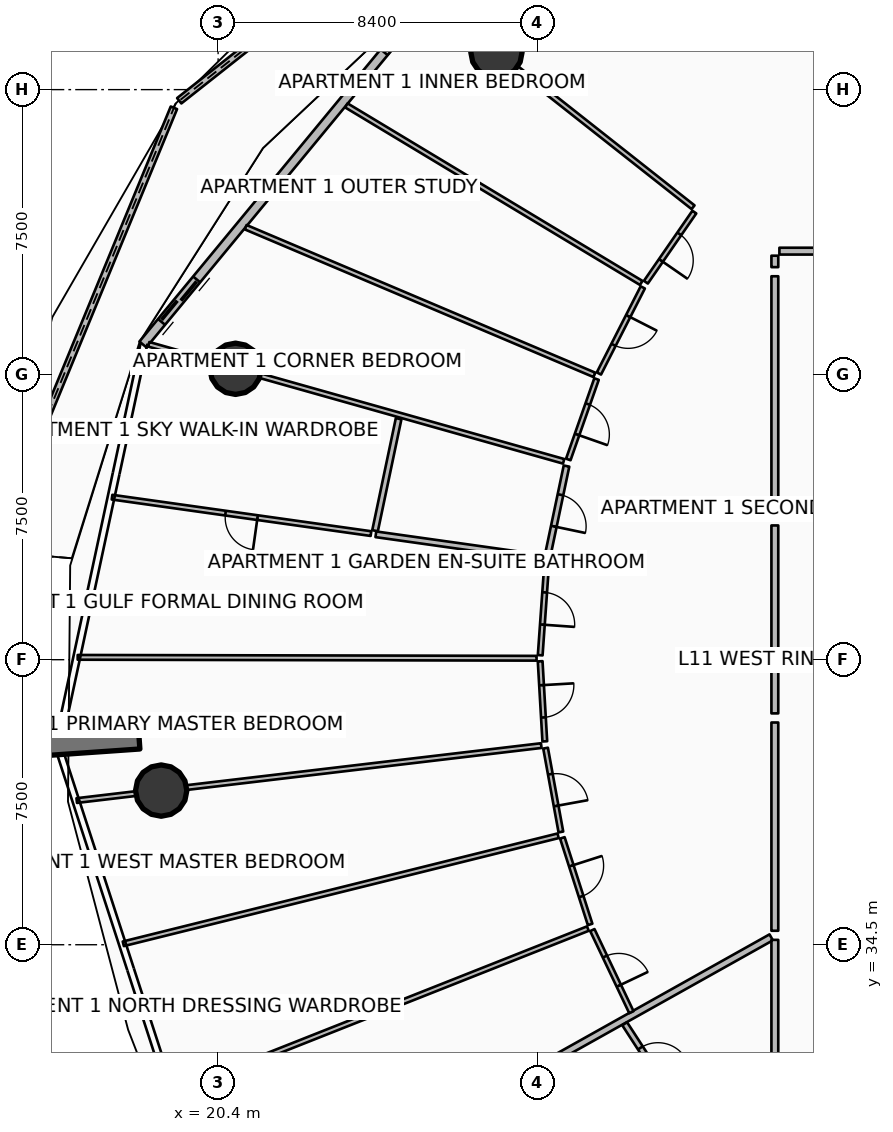
"""IFC4 building model, lengths in metres.
Left out: names, types, materials, properties, quantities, classifications, styles, units other than length and angle.
Written with IfcOpenShell. Run it as: python <this file> out.ifc"""

import sys

from ifc_helpers import new_model, si_unit, direction, frame, frame_2d, origin, origin_2d, place, context, subcontext, project, spatial, polyline, rectangle, circle, outline, extrude, element, fill, save


model = new_model("IFC4")
c1 = context("Model", 3, precision=1e-05, world=origin(), true_north=direction((0.0, 1.0)))
c2 = subcontext(c1, "Body", "Model", "MODEL_VIEW")
j1 = project(units=[si_unit("LENGTHUNIT", "METRE"), si_unit("PLANEANGLEUNIT", "RADIAN")], contexts=[c1])
p1 = place(None, origin())
s1 = spatial("IfcSite", under=j1, at=p1, CompositionType="ELEMENT")
p2 = place(p1, origin())
s2 = spatial("IfcBuilding", under=s1, at=p2, CompositionType="ELEMENT")
p3 = place(p2, frame((0.0, 0.0, 48.9)))
s3 = spatial("IfcBuildingStorey", under=s2, at=p3, CompositionType="ELEMENT", Elevation=48.9)
p4 = place(p3, frame((18.322, 39.925, 0.0), z_axis=(0.0, 0.0, 1.0), x_axis=(-0.997564163539, -0.069754853754, 0.0)))
e1 = element("IfcWall", 1, at=p4, inside=s3, PredefinedType="SOLIDWALL", context=c2, shape_type="SweptSolid", body=[
    extrude(rectangle(XDim=3.5, YDim=0.55, at=frame_2d((1.75, 0.0))), origin(), (0.0, 0.0, 1.0), 3.75),
])
for number, where, z_axis, x_axis in (
    (2, (27.724, 57.984, 0.0), (0.0, 0.0, 1.0), (1.0, 0.0, 0.0)),
    (3, (20.859, 49.655, 0.0), (0.0, 0.0, 1.0), (1.0, 0.0, 0.0)),
    (4, (18.902, 38.556, 0.0), (0.0, 0.0, 1.0), (1.0, 0.0, 0.0)),
):
    element("IfcColumn", number, at=place(p3, frame(where, z_axis=z_axis, x_axis=x_axis)), inside=s3, PredefinedType="COLUMN", context=c2, shape_type="SweptSolid", body=[
        extrude(circle(Radius=0.675, at=origin_2d()), origin(), (0.0, 0.0, 1.0), 3.5),
    ])
p5 = place(p3, frame((28.828, 64.171, 0.0), z_axis=(0.0, 0.0, 1.0), x_axis=(-0.784771193171, -0.619785587416, 0.0)))
e5 = element("IfcWall", 5, at=p5, inside=s3, PredefinedType="PARAPET", context=c2, shape_type="SweptSolid", body=[
    extrude(outline(polyline([(0.0, 0.0), (12.044, 0.0), (12.044, 1.832), (6.022, 1.853), (0.0, 1.756), (0.0, 0.0)])), frame((0.0, 0.09, 0.0), z_axis=(0.0, -1.0, 0.0), x_axis=(1.0, 0.0, 0.0)), (0.0, 0.0, 1.0), 0.18),
])
p6 = place(p3, frame((19.237, 56.521, 0.0), z_axis=(0.0, 0.0, 1.0), x_axis=(-0.381082407016, -0.924541074838, 0.0)))
e6 = element("IfcWall", 6, at=p6, inside=s3, PredefinedType="PARAPET", context=c2, shape_type="SweptSolid", body=[
    extrude(outline(polyline([(0.0, 0.0), (12.625, 0.0), (12.625, 1.497), (6.312, 1.696), (0.0, 1.832), (0.0, 0.0)])), frame((0.0, 0.09, 0.0), z_axis=(0.0, -1.0, 0.0), x_axis=(1.0, 0.0, 0.0)), (0.0, 0.0, 1.0), 0.18),
])
p7 = place(p3, frame((25.967, 59.433, 0.0), z_axis=(0.0, 0.0, 1.0), x_axis=(-0.636674332663, -0.771132799281, 0.0)))
e7 = element("IfcWall", 7, at=p7, inside=s3, PredefinedType="SOLIDWALL", context=c2, shape_type="SweptSolid", body=[
    extrude(rectangle(XDim=11.851, YDim=0.24, at=frame_2d((5.926, 0.0))), origin(), (0.0, 0.0, 1.0), 2.45),
])
p8 = place(p7, frame((9.631, 0.0, 0.0)))
e8 = element("IfcOpeningElement", 8, at=p8, cuts=e7, PredefinedType="OPENING", context=c2, shape_type="SweptSolid", body=[
    extrude(rectangle(XDim=1.45, YDim=2.15, at=frame_2d((0.725, 1.075))), frame((0.0, 0.13, 0.0), z_axis=(0.0, -1.0, 0.0), x_axis=(1.0, 0.0, 0.0)), (0.0, 0.0, 1.0), 0.26),
])
p9 = place(p7, frame((0.28, 0.0, 0.65)))
e9 = element("IfcOpeningElement", 9, at=p9, cuts=e7, PredefinedType="OPENING", context=c2, shape_type="SweptSolid", body=[
    extrude(rectangle(XDim=1.6, YDim=1.5, at=frame_2d((0.8, 0.75))), frame((0.0, 0.13, 0.0), z_axis=(0.0, -1.0, 0.0), x_axis=(1.0, 0.0, 0.0)), (0.0, 0.0, 1.0), 0.26),
])
p10 = place(p3, frame((34.954, 34.694, 0.0), z_axis=(0.0, 0.0, 1.0), x_axis=(-0.872493465611, -0.488625779577, 0.0)))
e10 = element("IfcWall", 10, at=p10, inside=s3, PredefinedType="PARTITIONING", context=c2, shape_type="SweptSolid", body=[
    extrude(rectangle(XDim=16.586, YDim=0.18, at=frame_2d((8.293, 0.0))), origin(), (0.0, 0.0, 1.0), 2.867),
])
p11 = place(p3, frame((41.86, 52.75, 0.0), z_axis=(0.0, 0.0, 1.0), x_axis=(-1.0, 0.0, 0.0)))
e11 = element("IfcWall", 11, at=p11, inside=s3, PredefinedType="PARTITIONING", context=c2, shape_type="SweptSolid", body=[
    extrude(rectangle(XDim=6.69, YDim=0.18, at=frame_2d((3.345, 0.0))), origin(), (0.0, 0.0, 1.0), 2.867),
])
p12 = place(p11, frame((2.795, 0.0, 0.0)))
e12 = element("IfcOpeningElement", 12, at=p12, cuts=e11, PredefinedType="OPENING", context=c2, shape_type="SweptSolid", body=[
    extrude(rectangle(XDim=1.1, YDim=2.1, at=frame_2d((0.55, 1.05))), frame((0.0, 0.1, 0.0), z_axis=(0.0, -1.0, 0.0), x_axis=(1.0, 0.0, 0.0)), (0.0, 0.0, 1.0), 0.2),
])
p13 = place(p3, frame((35.05, 52.63, 0.0), z_axis=(0.0, 0.0, 1.0), x_axis=(0.0, -1.0, 0.0)))
e13 = element("IfcWall", 13, at=p13, inside=s3, PredefinedType="PARTITIONING", context=c2, shape_type="SweptSolid", body=[
    extrude(rectangle(XDim=0.301, YDim=0.18, at=frame_2d((0.15, 0.0))), origin(), (0.0, 0.0, 1.0), 2.867),
])
p14 = place(p3, frame((35.05, 52.089, 0.0), z_axis=(0.0, 0.0, 1.0), x_axis=(0.0, -1.0, 0.0)))
e14 = element("IfcWall", 14, at=p14, inside=s3, PredefinedType="PARTITIONING", context=c2, shape_type="SweptSolid", body=[
    extrude(rectangle(XDim=6.317, YDim=0.18, at=frame_2d((3.158, 0.0))), origin(), (0.0, 0.0, 1.0), 2.867),
])
p15 = place(p3, frame((32.898, 53.905, 0.0), z_axis=(0.0, 0.0, 1.0), x_axis=(-0.78532854108, 0.619079221558, 0.0)))
e15 = element("IfcWall", 15, at=p15, inside=s3, PredefinedType="PARTITIONING", context=c2, shape_type="SweptSolid", body=[
    extrude(rectangle(XDim=8.842, YDim=0.125, at=frame_2d((4.421, 0.0))), origin(), (0.0, 0.0, 1.0), 2.867),
])
p16 = place(p3, frame((31.534, 51.913, 0.0), z_axis=(0.0, 0.0, 1.0), x_axis=(-0.856706990958, 0.515803384676, 0.0)))
e16 = element("IfcWall", 16, at=p16, inside=s3, PredefinedType="PARTITIONING", context=c2, shape_type="SweptSolid", body=[
    extrude(rectangle(XDim=9.057, YDim=0.125, at=frame_2d((4.528, 0.0))), origin(), (0.0, 0.0, 1.0), 2.94),
])
p17 = place(p3, frame((30.301, 49.494, 0.0), z_axis=(0.0, 0.0, 1.0), x_axis=(-0.920840746031, 0.389938867579, 0.0)))
e17 = element("IfcWall", 17, at=p17, inside=s3, PredefinedType="PARTITIONING", context=c2, shape_type="SweptSolid", body=[
    extrude(rectangle(XDim=9.966, YDim=0.125, at=frame_2d((4.983, 0.0))), origin(), (0.0, 0.0, 1.0), 2.94),
])
p18 = place(p3, frame((32.931, 53.778, 0.0), z_axis=(0.0, 0.0, 1.0), x_axis=(-0.568541738061, -0.822654418382, 0.0)))
e18 = element("IfcWall", 18, at=p18, inside=s3, PredefinedType="PARTITIONING", context=c2, shape_type="SweptSolid", body=[
    extrude(rectangle(XDim=2.242, YDim=0.125, at=frame_2d((1.121, 0.0))), origin(), (0.0, 0.0, 1.0), 2.867),
])
p19 = place(p18, frame((0.696, 0.0, 0.0)))
e19 = element("IfcOpeningElement", 19, at=p19, cuts=e18, PredefinedType="OPENING", context=c2, shape_type="SweptSolid", body=[
    extrude(rectangle(XDim=0.85, YDim=2.06, at=frame_2d((0.425, 1.03))), frame((0.0, 0.073, 0.0), z_axis=(0.0, -1.0, 0.0), x_axis=(1.0, 0.0, 0.0)), (0.0, 0.0, 1.0), 0.145),
])
p20 = place(p3, frame((31.575, 51.796, 0.0), z_axis=(0.0, 0.0, 1.0), x_axis=(-0.454037986735, -0.890982326762, 0.0)))
e20 = element("IfcWall", 20, at=p20, inside=s3, PredefinedType="PARTITIONING", context=c2, shape_type="SweptSolid", body=[
    extrude(rectangle(XDim=2.542, YDim=0.125, at=frame_2d((1.271, 0.0))), origin(), (0.0, 0.0, 1.0), 2.94),
])
p21 = place(p20, frame((0.846, 0.0, 0.0)))
e21 = element("IfcOpeningElement", 21, at=p21, cuts=e20, PredefinedType="OPENING", context=c2, shape_type="SweptSolid", body=[
    extrude(rectangle(XDim=0.85, YDim=2.06, at=frame_2d((0.425, 1.03))), frame((0.0, 0.073, 0.0), z_axis=(0.0, -1.0, 0.0), x_axis=(1.0, 0.0, 0.0)), (0.0, 0.0, 1.0), 0.145),
])
p22 = place(p3, frame((30.358, 49.384, 0.0), z_axis=(0.0, 0.0, 1.0), x_axis=(-0.331344536708, -0.943509829304, 0.0)))
e22 = element("IfcWall", 22, at=p22, inside=s3, PredefinedType="PARTITIONING", context=c2, shape_type="SweptSolid", body=[
    extrude(rectangle(XDim=2.242, YDim=0.125, at=frame_2d((1.121, 0.0))), origin(), (0.0, 0.0, 1.0), 2.867),
])
p23 = place(p22, frame((0.696, 0.0, 0.0)))
e23 = element("IfcOpeningElement", 23, at=p23, cuts=e22, PredefinedType="OPENING", context=c2, shape_type="SweptSolid", body=[
    extrude(rectangle(XDim=0.85, YDim=2.06, at=frame_2d((0.425, 1.03))), frame((0.0, 0.073, 0.0), z_axis=(0.0, -1.0, 0.0), x_axis=(1.0, 0.0, 0.0)), (0.0, 0.0, 1.0), 0.145),
])
p24 = place(p3, frame((35.05, 45.532, 0.0), z_axis=(0.0, 0.0, 1.0), x_axis=(0.0, -1.0, 0.0)))
e24 = element("IfcWall", 24, at=p24, inside=s3, PredefinedType="PARTITIONING", context=c2, shape_type="SweptSolid", body=[
    extrude(rectangle(XDim=4.945, YDim=0.18, at=frame_2d((2.472, 0.0))), origin(), (0.0, 0.0, 1.0), 2.867),
])
p25 = place(p3, frame((29.492, 47.22, 0.0), z_axis=(0.0, 0.0, 1.0), x_axis=(-0.962454721813, 0.271442274635, 0.0)))
e25 = element("IfcWall", 25, at=p25, inside=s3, PredefinedType="PARTITIONING", context=c2, shape_type="SweptSolid", body=[
    extrude(rectangle(XDim=11.344, YDim=0.125, at=frame_2d((5.672, 0.0))), origin(), (0.0, 0.0, 1.0), 2.867),
])
p26 = place(p3, frame((29.568, 47.095, 0.0), z_axis=(0.0, 0.0, 1.0), x_axis=(-0.205861309483, -0.978581177654, 0.0)))
e26 = element("IfcWall", 26, at=p26, inside=s3, PredefinedType="PARTITIONING", context=c2, shape_type="SweptSolid", body=[
    extrude(rectangle(XDim=2.392, YDim=0.15, at=frame_2d((1.196, 0.0))), origin(), (0.0, 0.0, 1.0), 2.867),
])
p27 = place(p26, frame((0.771, 0.0, 0.0)))
e27 = element("IfcOpeningElement", 27, at=p27, cuts=e26, PredefinedType="OPENING", context=c2, shape_type="SweptSolid", body=[
    extrude(rectangle(XDim=0.85, YDim=2.06, at=frame_2d((0.425, 1.03))), frame((0.0, 0.085, 0.0), z_axis=(0.0, -1.0, 0.0), x_axis=(1.0, 0.0, 0.0)), (0.0, 0.0, 1.0), 0.17),
])
p28 = place(p3, frame((25.15, 48.341, 0.0), z_axis=(0.0, 0.0, 1.0), x_axis=(-0.205879759174, -0.978577296264, 0.0)))
e28 = element("IfcWall", 28, at=p28, inside=s3, PredefinedType="PARTITIONING", context=c2, shape_type="SweptSolid", body=[
    extrude(rectangle(XDim=3.012, YDim=0.15, at=frame_2d((1.506, 0.0))), origin(), (0.0, 0.0, 1.0), 2.867),
])
p29 = place(p3, frame((28.968, 44.678, 0.0), z_axis=(0.0, 0.0, 1.0), x_axis=(-0.990240767804, 0.139367219172, 0.0)))
e29 = element("IfcWall", 29, at=p29, inside=s3, PredefinedType="PARTITIONING", context=c2, shape_type="SweptSolid", body=[
    extrude(rectangle(XDim=4.46, YDim=0.15, at=frame_2d((2.23, 0.0))), origin(), (0.0, 0.0, 1.0), 2.94),
])
p30 = place(p3, frame((24.422, 45.318, 0.0), z_axis=(0.0, 0.0, 1.0), x_axis=(-0.990243959665, 0.139344538274, 0.0)))
e30 = element("IfcWall", 30, at=p30, inside=s3, PredefinedType="PARTITIONING", context=c2, shape_type="SweptSolid", body=[
    extrude(rectangle(XDim=6.88, YDim=0.125, at=frame_2d((3.44, 0.0))), origin(), (0.0, 0.0, 1.0), 2.94),
])
p31 = place(p30, frame((3.015, 0.0, 0.0)))
e31 = element("IfcOpeningElement", 31, at=p31, cuts=e30, PredefinedType="OPENING", context=c2, shape_type="SweptSolid", body=[
    extrude(rectangle(XDim=0.85, YDim=2.06, at=frame_2d((0.425, 1.03))), frame((0.0, 0.073, 0.0), z_axis=(0.0, -1.0, 0.0), x_axis=(1.0, 0.0, 0.0)), (0.0, 0.0, 1.0), 0.145),
])
p32 = place(p3, frame((28.78, 42.038, 0.0), z_axis=(0.0, 0.0, 1.0), x_axis=(-0.999998036955, 0.001981435282, 0.0)))
e32 = element("IfcWall", 32, at=p32, inside=s3, PredefinedType="PARTITIONING", context=c2, shape_type="SweptSolid", body=[
    extrude(rectangle(XDim=12.075, YDim=0.125, at=frame_2d((6.038, 0.0))), origin(), (0.0, 0.0, 1.0), 2.94),
])
p33 = place(p3, frame((29.05, 44.576, 0.0), z_axis=(0.0, 0.0, 1.0), x_axis=(-0.070831673661, -0.997488282641, 0.0)))
e33 = element("IfcWall", 33, at=p33, inside=s3, PredefinedType="PARTITIONING", context=c2, shape_type="SweptSolid", body=[
    extrude(rectangle(XDim=2.464, YDim=0.125, at=frame_2d((1.232, 0.0))), origin(), (0.0, 0.0, 1.0), 2.94),
])
p34 = place(p33, frame((0.807, 0.0, 0.0)))
e34 = element("IfcOpeningElement", 34, at=p34, cuts=e33, PredefinedType="OPENING", context=c2, shape_type="SweptSolid", body=[
    extrude(rectangle(XDim=0.85, YDim=2.06, at=frame_2d((0.425, 1.03))), frame((0.0, 0.073, 0.0), z_axis=(0.0, -1.0, 0.0), x_axis=(1.0, 0.0, 0.0)), (0.0, 0.0, 1.0), 0.145),
])
p35 = place(p3, frame((28.875, 41.958, 0.0), z_axis=(0.0, 0.0, 1.0), x_axis=(0.057962417622, -0.998318765797, 0.0)))
e35 = element("IfcWall", 35, at=p35, inside=s3, PredefinedType="PARTITIONING", context=c2, shape_type="SweptSolid", body=[
    extrude(rectangle(XDim=2.11, YDim=0.125, at=frame_2d((1.055, 0.0))), origin(), (0.0, 0.0, 1.0), 2.867),
])
p36 = place(p35, frame((0.63, 0.0, 0.0)))
e36 = element("IfcOpeningElement", 36, at=p36, cuts=e35, PredefinedType="OPENING", context=c2, shape_type="SweptSolid", body=[
    extrude(rectangle(XDim=0.85, YDim=2.06, at=frame_2d((0.425, 1.03))), frame((0.0, 0.073, 0.0), z_axis=(0.0, -1.0, 0.0), x_axis=(1.0, 0.0, 0.0)), (0.0, 0.0, 1.0), 0.145),
])
p37 = place(p3, frame((35.05, 40.347, 0.0), z_axis=(0.0, 0.0, 1.0), x_axis=(0.0, -1.0, 0.0)))
e37 = element("IfcWall", 37, at=p37, inside=s3, PredefinedType="PARTITIONING", context=c2, shape_type="SweptSolid", body=[
    extrude(rectangle(XDim=5.48, YDim=0.18, at=frame_2d((2.74, 0.0))), origin(), (0.0, 0.0, 1.0), 2.867),
])
p38 = place(p3, frame((28.903, 39.74, 0.0), z_axis=(0.0, 0.0, 1.0), x_axis=(-0.993068040113, -0.117540919282, 0.0)))
e38 = element("IfcWall", 38, at=p38, inside=s3, PredefinedType="PARTITIONING", context=c2, shape_type="SweptSolid", body=[
    extrude(rectangle(XDim=12.309, YDim=0.125, at=frame_2d((6.154, 0.0))), origin(), (0.0, 0.0, 1.0), 2.867),
])
p39 = place(p3, frame((29.347, 37.366, 0.0), z_axis=(0.0, 0.0, 1.0), x_axis=(-0.970510462135, -0.241059002917, 0.0)))
e39 = element("IfcWall", 39, at=p39, inside=s3, PredefinedType="PARTITIONING", context=c2, shape_type="SweptSolid", body=[
    extrude(rectangle(XDim=11.79, YDim=0.125, at=frame_2d((5.895, 0.0))), origin(), (0.0, 0.0, 1.0), 2.94),
])
p40 = place(p3, frame((30.13, 34.925, 0.0), z_axis=(0.0, 0.0, 1.0), x_axis=(-0.929770978957, -0.368138461302, 0.0)))
e40 = element("IfcWall", 40, at=p40, inside=s3, PredefinedType="PARTITIONING", context=c2, shape_type="SweptSolid", body=[
    extrude(rectangle(XDim=11.773, YDim=0.125, at=frame_2d((5.887, 0.0))), origin(), (0.0, 0.0, 1.0), 2.94),
])
p41 = place(p3, frame((29.017, 39.673, 0.0), z_axis=(0.0, 0.0, 1.0), x_axis=(0.179632658462, -0.983733758704, 0.0)))
e41 = element("IfcWall", 41, at=p41, inside=s3, PredefinedType="PARTITIONING", context=c2, shape_type="SweptSolid", body=[
    extrude(rectangle(XDim=2.242, YDim=0.125, at=frame_2d((1.121, 0.0))), origin(), (0.0, 0.0, 1.0), 2.867),
])
p42 = place(p41, frame((0.696, 0.0, 0.0)))
e42 = element("IfcOpeningElement", 42, at=p42, cuts=e41, PredefinedType="OPENING", context=c2, shape_type="SweptSolid", body=[
    extrude(rectangle(XDim=0.85, YDim=2.06, at=frame_2d((0.425, 1.03))), frame((0.0, 0.073, 0.0), z_axis=(0.0, -1.0, 0.0), x_axis=(1.0, 0.0, 0.0)), (0.0, 0.0, 1.0), 0.145),
])
p43 = place(p3, frame((29.458, 37.312, 0.0), z_axis=(0.0, 0.0, 1.0), x_axis=(0.305338513131, -0.952243872335, 0.0)))
e43 = element("IfcWall", 43, at=p43, inside=s3, PredefinedType="PARTITIONING", context=c2, shape_type="SweptSolid", body=[
    extrude(rectangle(XDim=2.392, YDim=0.125, at=frame_2d((1.196, 0.0))), origin(), (0.0, 0.0, 1.0), 2.94),
])
p44 = place(p43, frame((0.771, 0.0, 0.0)))
e44 = element("IfcOpeningElement", 44, at=p44, cuts=e43, PredefinedType="OPENING", context=c2, shape_type="SweptSolid", body=[
    extrude(rectangle(XDim=0.85, YDim=2.06, at=frame_2d((0.425, 1.03))), frame((0.0, 0.073, 0.0), z_axis=(0.0, -1.0, 0.0), x_axis=(1.0, 0.0, 0.0)), (0.0, 0.0, 1.0), 0.145),
])
p45 = place(p3, frame((30.248, 34.885, 0.0), z_axis=(0.0, 0.0, 1.0), x_axis=(0.429366977128, -0.903130111862, 0.0)))
e45 = element("IfcWall", 45, at=p45, inside=s3, PredefinedType="PARTITIONING", context=c2, shape_type="SweptSolid", body=[
    extrude(rectangle(XDim=2.392, YDim=0.125, at=frame_2d((1.196, 0.0))), origin(), (0.0, 0.0, 1.0), 2.867),
])
p46 = place(p45, frame((0.771, 0.0, 0.0)))
e46 = element("IfcOpeningElement", 46, at=p46, cuts=e45, PredefinedType="OPENING", context=c2, shape_type="SweptSolid", body=[
    extrude(rectangle(XDim=0.85, YDim=2.06, at=frame_2d((0.425, 1.03))), frame((0.0, 0.073, 0.0), z_axis=(0.0, -1.0, 0.0), x_axis=(1.0, 0.0, 0.0)), (0.0, 0.0, 1.0), 0.145),
])
p47 = place(p3, frame((35.05, 34.628, 0.0), z_axis=(0.0, 0.0, 1.0), x_axis=(0.0, -1.0, 0.0)))
e47 = element("IfcWall", 47, at=p47, inside=s3, PredefinedType="PARTITIONING", context=c2, shape_type="SweptSolid", body=[
    extrude(rectangle(XDim=3.258, YDim=0.18, at=frame_2d((1.629, 0.0))), origin(), (0.0, 0.0, 1.0), 2.867),
])
p48 = place(p3, frame((31.098, 32.42, 0.0), z_axis=(0.0, 0.0, 1.0), x_axis=(0.544893998924, -0.838504937336, 0.0)))
e48 = element("IfcWall", 48, at=p48, inside=s3, PredefinedType="PARTITIONING", context=c2, shape_type="SweptSolid", body=[
    extrude(rectangle(XDim=2.365, YDim=0.15, at=frame_2d((1.182, 0.0))), origin(), (0.0, 0.0, 1.0), 2.867),
])
p49 = place(p48, frame((0.757, 0.0, 0.0)))
e49 = element("IfcOpeningElement", 49, at=p49, cuts=e48, PredefinedType="OPENING", context=c2, shape_type="SweptSolid", body=[
    extrude(rectangle(XDim=0.85, YDim=2.06, at=frame_2d((0.425, 1.03))), frame((0.0, 0.085, 0.0), z_axis=(0.0, -1.0, 0.0), x_axis=(1.0, 0.0, 0.0)), (0.0, 0.0, 1.0), 0.17),
])
p50 = place(p8, origin())
e50 = element("IfcDoor", 50, at=p50, inside=s3, OperationType="DOUBLE_DOOR_SLIDING", PredefinedType="DOOR", context=c2, shape_type="SweptSolid", body=[
    extrude(rectangle(XDim=1.45, YDim=2.15, at=frame_2d((0.725, 1.075))), frame((0.0, 0.025, 0.0), z_axis=(0.0, -1.0, 0.0), x_axis=(1.0, 0.0, 0.0)), (0.0, 0.0, 1.0), 0.05),
])
fill(e8, e50)
p51 = place(p9, origin())
e51 = element("IfcWindow", 51, at=p51, inside=s3, PartitioningType="SINGLE_PANEL", PredefinedType="WINDOW", context=c2, shape_type="SweptSolid", body=[
    extrude(rectangle(XDim=1.6, YDim=1.5, at=frame_2d((0.8, 0.75))), frame((0.0, 0.03, 0.0), z_axis=(0.0, -1.0, 0.0), x_axis=(1.0, 0.0, 0.0)), (0.0, 0.0, 1.0), 0.06),
])
fill(e9, e51)
p52 = place(p19, origin())
e52 = element("IfcDoor", 52, at=p52, inside=s3, OperationType="SINGLE_SWING_RIGHT", PredefinedType="DOOR", context=c2, shape_type="SweptSolid", body=[
    extrude(rectangle(XDim=0.85, YDim=2.06, at=frame_2d((0.425, 1.03))), frame((0.0, 0.025, 0.0), z_axis=(0.0, -1.0, 0.0), x_axis=(1.0, 0.0, 0.0)), (0.0, 0.0, 1.0), 0.05),
])
fill(e19, e52)
p53 = place(p21, origin())
e53 = element("IfcDoor", 53, at=p53, inside=s3, OperationType="SINGLE_SWING_LEFT", PredefinedType="DOOR", context=c2, shape_type="SweptSolid", body=[
    extrude(rectangle(XDim=0.85, YDim=2.06, at=frame_2d((0.425, 1.03))), frame((0.0, 0.025, 0.0), z_axis=(0.0, -1.0, 0.0), x_axis=(1.0, 0.0, 0.0)), (0.0, 0.0, 1.0), 0.05),
])
fill(e21, e53)
p54 = place(p23, origin())
e54 = element("IfcDoor", 54, at=p54, inside=s3, OperationType="SINGLE_SWING_RIGHT", PredefinedType="DOOR", context=c2, shape_type="SweptSolid", body=[
    extrude(rectangle(XDim=0.85, YDim=2.06, at=frame_2d((0.425, 1.03))), frame((0.0, 0.025, 0.0), z_axis=(0.0, -1.0, 0.0), x_axis=(1.0, 0.0, 0.0)), (0.0, 0.0, 1.0), 0.05),
])
fill(e23, e54)
p55 = place(p27, origin())
e55 = element("IfcDoor", 55, at=p55, inside=s3, OperationType="SINGLE_SWING_RIGHT", PredefinedType="DOOR", context=c2, shape_type="SweptSolid", body=[
    extrude(rectangle(XDim=0.85, YDim=2.06, at=frame_2d((0.425, 1.03))), frame((0.0, 0.025, 0.0), z_axis=(0.0, -1.0, 0.0), x_axis=(1.0, 0.0, 0.0)), (0.0, 0.0, 1.0), 0.05),
])
fill(e27, e55)
p56 = place(p31, origin())
e56 = element("IfcDoor", 56, at=p56, inside=s3, OperationType="SINGLE_SWING_LEFT", PredefinedType="DOOR", context=c2, shape_type="SweptSolid", body=[
    extrude(rectangle(XDim=0.85, YDim=2.06, at=frame_2d((0.425, 1.03))), frame((0.0, 0.025, 0.0), z_axis=(0.0, -1.0, 0.0), x_axis=(1.0, 0.0, 0.0)), (0.0, 0.0, 1.0), 0.05),
])
fill(e31, e56)
p57 = place(p34, origin())
e57 = element("IfcDoor", 57, at=p57, inside=s3, OperationType="SINGLE_SWING_RIGHT", PredefinedType="DOOR", context=c2, shape_type="SweptSolid", body=[
    extrude(rectangle(XDim=0.85, YDim=2.06, at=frame_2d((0.425, 1.03))), frame((0.0, 0.025, 0.0), z_axis=(0.0, -1.0, 0.0), x_axis=(1.0, 0.0, 0.0)), (0.0, 0.0, 1.0), 0.05),
])
fill(e34, e57)
p58 = place(p36, origin())
e58 = element("IfcDoor", 58, at=p58, inside=s3, OperationType="SINGLE_SWING_LEFT", PredefinedType="DOOR", context=c2, shape_type="SweptSolid", body=[
    extrude(rectangle(XDim=0.85, YDim=2.06, at=frame_2d((0.425, 1.03))), frame((0.0, 0.025, 0.0), z_axis=(0.0, -1.0, 0.0), x_axis=(1.0, 0.0, 0.0)), (0.0, 0.0, 1.0), 0.05),
])
fill(e36, e58)
p59 = place(p42, origin())
e59 = element("IfcDoor", 59, at=p59, inside=s3, OperationType="SINGLE_SWING_RIGHT", PredefinedType="DOOR", context=c2, shape_type="SweptSolid", body=[
    extrude(rectangle(XDim=0.85, YDim=2.06, at=frame_2d((0.425, 1.03))), frame((0.0, 0.025, 0.0), z_axis=(0.0, -1.0, 0.0), x_axis=(1.0, 0.0, 0.0)), (0.0, 0.0, 1.0), 0.05),
])
fill(e42, e59)
p60 = place(p44, origin())
e60 = element("IfcDoor", 60, at=p60, inside=s3, OperationType="SINGLE_SWING_LEFT", PredefinedType="DOOR", context=c2, shape_type="SweptSolid", body=[
    extrude(rectangle(XDim=0.85, YDim=2.06, at=frame_2d((0.425, 1.03))), frame((0.0, 0.025, 0.0), z_axis=(0.0, -1.0, 0.0), x_axis=(1.0, 0.0, 0.0)), (0.0, 0.0, 1.0), 0.05),
])
fill(e44, e60)
p61 = place(p46, origin())
e61 = element("IfcDoor", 61, at=p61, inside=s3, OperationType="SINGLE_SWING_RIGHT", PredefinedType="DOOR", context=c2, shape_type="SweptSolid", body=[
    extrude(rectangle(XDim=0.85, YDim=2.06, at=frame_2d((0.425, 1.03))), frame((0.0, 0.025, 0.0), z_axis=(0.0, -1.0, 0.0), x_axis=(1.0, 0.0, 0.0)), (0.0, 0.0, 1.0), 0.05),
])
fill(e46, e61)
p62 = place(p49, origin())
e62 = element("IfcDoor", 62, at=p62, inside=s3, OperationType="SINGLE_SWING_RIGHT", PredefinedType="DOOR", context=c2, shape_type="SweptSolid", body=[
    extrude(rectangle(XDim=0.85, YDim=2.06, at=frame_2d((0.425, 1.03))), frame((0.0, 0.025, 0.0), z_axis=(0.0, -1.0, 0.0), x_axis=(1.0, 0.0, 0.0)), (0.0, 0.0, 1.0), 0.05),
])
fill(e49, e62)
save(model, sys.argv[1])
